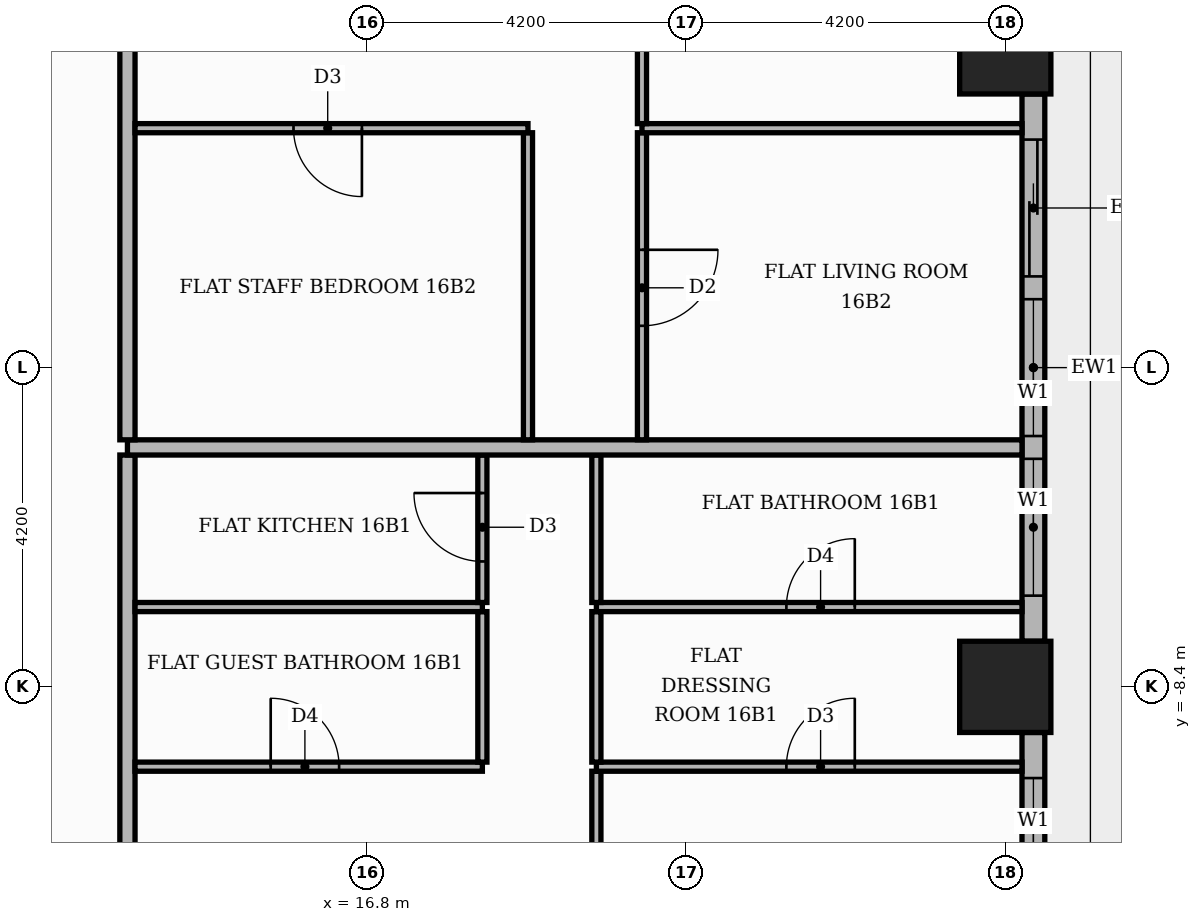
"""IFC4 building model, lengths in metres.
Left out: names, types, materials, properties, quantities, classifications, styles, units other than length and angle.
Written with IfcOpenShell. Run it as: python <this file> out.ifc"""

import sys

from ifc_helpers import new_model, si_unit, direction, frame, frame_2d, origin, origin_2d, place, context, subcontext, project, spatial, rectangle, extrude, element, fill, save


model = new_model("IFC4")
c1 = context("Model", 3, precision=1e-05, world=origin(), true_north=direction((0.0, 1.0)))
c2 = subcontext(c1, "Body", "Model", "MODEL_VIEW")
j1 = project(units=[si_unit("LENGTHUNIT", "METRE"), si_unit("PLANEANGLEUNIT", "RADIAN")], contexts=[c1])
p1 = place(None, origin())
s1 = spatial("IfcSite", under=j1, at=p1, CompositionType="ELEMENT")
p2 = place(p1, origin())
s2 = spatial("IfcBuilding", under=s1, at=p2, CompositionType="ELEMENT")
p3 = place(p2, frame((0.0, 0.0, 69.9)))
s3 = spatial("IfcBuildingStorey", under=s2, at=p3, CompositionType="ELEMENT", Elevation=69.9)
for number, where, z_axis, x_axis in (
    (1, (25.2, 0.0, 0.0), (0.0, 0.0, 1.0), (1.0, 0.0, 0.0)),
    (2, (25.2, -8.4, 0.0), (0.0, 0.0, 1.0), (1.0, 0.0, 0.0)),
):
    element("IfcColumn", number, at=place(p3, frame(where, z_axis=z_axis, x_axis=x_axis)), inside=s3, PredefinedType="COLUMN", context=c2, shape_type="SweptSolid", body=[
        extrude(rectangle(XDim=1.2, YDim=1.2, at=origin_2d()), origin(), (0.0, 0.0, 1.0), 3.9),
    ])
p4 = place(p3, frame((25.57, -16.2, 0.0), z_axis=(0.0, 0.0, 1.0), x_axis=(0.0, 1.0, 0.0)))
e3 = element("IfcWall", 3, at=p4, inside=s3, PredefinedType="STANDARD", context=c2, shape_type="SweptSolid", body=[
    extrude(rectangle(XDim=7.2, YDim=0.3, at=frame_2d((3.6, 0.0))), origin(), (0.0, 0.0, 1.0), 3.4),
])
p5 = place(p4, frame((0.6, 0.0, 0.0)))
e4 = element("IfcOpeningElement", 4, at=p5, cuts=e3, PredefinedType="OPENING", context=c2, shape_type="SweptSolid", body=[
    extrude(rectangle(XDim=1.8, YDim=2.4, at=frame_2d((0.9, 1.2))), frame((0.0, 0.16, 0.0), z_axis=(0.0, -1.0, 0.0), x_axis=(1.0, 0.0, 0.0)), (0.0, 0.0, 1.0), 0.32),
])
p6 = place(p4, frame((2.7, 0.0, 0.0)))
e5 = element("IfcOpeningElement", 5, at=p6, cuts=e3, PredefinedType="OPENING", context=c2, shape_type="SweptSolid", body=[
    extrude(rectangle(XDim=1.8, YDim=2.4, at=frame_2d((0.9, 1.2))), frame((0.0, 0.16, 0.0), z_axis=(0.0, -1.0, 0.0), x_axis=(1.0, 0.0, 0.0)), (0.0, 0.0, 1.0), 0.32),
])
p7 = place(p4, frame((4.8, 0.0, 0.9)))
e6 = element("IfcOpeningElement", 6, at=p7, cuts=e3, PredefinedType="OPENING", context=c2, shape_type="SweptSolid", body=[
    extrude(rectangle(XDim=1.8, YDim=2.1, at=frame_2d((0.9, 1.05))), frame((0.0, 0.16, 0.0), z_axis=(0.0, -1.0, 0.0), x_axis=(1.0, 0.0, 0.0)), (0.0, 0.0, 1.0), 0.32),
])
p8 = place(p3, frame((25.57, -7.8, 0.0), z_axis=(0.0, 0.0, 1.0), x_axis=(0.0, 1.0, 0.0)))
e7 = element("IfcWall", 7, at=p8, inside=s3, PredefinedType="STANDARD", context=c2, shape_type="SweptSolid", body=[
    extrude(rectangle(XDim=7.2, YDim=0.3, at=frame_2d((3.6, 0.0))), origin(), (0.0, 0.0, 1.0), 3.4),
])
p9 = place(p8, frame((0.6, 0.0, 0.9)))
e8 = element("IfcOpeningElement", 8, at=p9, cuts=e7, PredefinedType="OPENING", context=c2, shape_type="SweptSolid", body=[
    extrude(rectangle(XDim=1.8, YDim=2.1, at=frame_2d((0.9, 1.05))), frame((0.0, 0.16, 0.0), z_axis=(0.0, -1.0, 0.0), x_axis=(1.0, 0.0, 0.0)), (0.0, 0.0, 1.0), 0.32),
])
p10 = place(p8, frame((2.7, 0.0, 0.9)))
e9 = element("IfcOpeningElement", 9, at=p10, cuts=e7, PredefinedType="OPENING", context=c2, shape_type="SweptSolid", body=[
    extrude(rectangle(XDim=1.8, YDim=2.1, at=frame_2d((0.9, 1.05))), frame((0.0, 0.16, 0.0), z_axis=(0.0, -1.0, 0.0), x_axis=(1.0, 0.0, 0.0)), (0.0, 0.0, 1.0), 0.32),
])
p11 = place(p8, frame((4.8, 0.0, 0.0)))
e10 = element("IfcOpeningElement", 10, at=p11, cuts=e7, PredefinedType="OPENING", context=c2, shape_type="SweptSolid", body=[
    extrude(rectangle(XDim=1.8, YDim=2.4, at=frame_2d((0.9, 1.2))), frame((0.0, 0.16, 0.0), z_axis=(0.0, -1.0, 0.0), x_axis=(1.0, 0.0, 0.0)), (0.0, 0.0, 1.0), 0.32),
])
p12 = place(p3, frame((19.82, -13.59, 0.0), z_axis=(0.0, 0.0, 1.0), x_axis=(0.0, 1.0, 0.0)))
e11 = element("IfcWall", 11, at=p12, inside=s3, PredefinedType="PARTITIONING", context=c2, shape_type="SweptSolid", body=[
    extrude(rectangle(XDim=4.08, YDim=0.12, at=frame_2d((2.04, 0.0))), origin(), (0.0, 0.0, 1.0), 3.4),
])
p13 = place(p12, frame((1.59, 0.0, 0.0)))
e12 = element("IfcOpeningElement", 12, at=p13, cuts=e11, PredefinedType="OPENING", context=c2, shape_type="SweptSolid", body=[
    extrude(rectangle(XDim=0.9, YDim=2.1, at=frame_2d((0.45, 1.05))), frame((0.0, 0.07, 0.0), z_axis=(0.0, -1.0, 0.0), x_axis=(1.0, 0.0, 0.0)), (0.0, 0.0, 1.0), 0.14),
])
p14 = place(p3, frame((13.65, -13.55, 0.0), z_axis=(0.0, 0.0, 1.0), x_axis=(0.0, 1.0, 0.0)))
e13 = element("IfcWall", 13, at=p14, inside=s3, PredefinedType="PARTITIONING", context=c2, shape_type="SweptSolid", body=[
    extrude(rectangle(XDim=8.2, YDim=0.2, at=frame_2d((4.1, 0.0))), origin(), (0.0, 0.0, 1.0), 3.4),
])
p15 = place(p14, frame((1.45, 0.0, 0.0)))
e14 = element("IfcOpeningElement", 14, at=p15, cuts=e13, PredefinedType="OPENING", context=c2, shape_type="SweptSolid", body=[
    extrude(rectangle(XDim=1.1, YDim=2.4, at=frame_2d((0.55, 1.2))), frame((0.0, 0.11, 0.0), z_axis=(0.0, -1.0, 0.0), x_axis=(1.0, 0.0, 0.0)), (0.0, 0.0, 1.0), 0.22),
])
p16 = place(p3, frame((13.75, -9.45, 0.0), z_axis=(0.0, 0.0, 1.0), x_axis=(1.0, 0.0, 0.0)))
e15 = element("IfcWall", 15, at=p16, inside=s3, PredefinedType="PARTITIONING", context=c2, shape_type="SweptSolid", body=[
    extrude(rectangle(XDim=4.57, YDim=0.12, at=frame_2d((2.285, 0.0))), origin(), (0.0, 0.0, 1.0), 3.4),
])
p17 = place(p16, frame((1.785, 0.0, 0.0)))
e16 = element("IfcOpeningElement", 16, at=p17, cuts=e15, PredefinedType="OPENING", context=c2, shape_type="SweptSolid", body=[
    extrude(rectangle(XDim=0.9, YDim=2.1, at=frame_2d((0.45, 1.05))), frame((0.0, 0.07, 0.0), z_axis=(0.0, -1.0, 0.0), x_axis=(1.0, 0.0, 0.0)), (0.0, 0.0, 1.0), 0.14),
])
p18 = place(p3, frame((19.82, -9.45, 0.0), z_axis=(0.0, 0.0, 1.0), x_axis=(1.0, 0.0, 0.0)))
e17 = element("IfcWall", 17, at=p18, inside=s3, PredefinedType="PARTITIONING", context=c2, shape_type="SweptSolid", body=[
    extrude(rectangle(XDim=5.6, YDim=0.12, at=frame_2d((2.8, 0.0))), origin(), (0.0, 0.0, 1.0), 3.4),
])
p19 = place(p18, frame((2.5, 0.0, 0.0)))
e18 = element("IfcOpeningElement", 18, at=p19, cuts=e17, PredefinedType="OPENING", context=c2, shape_type="SweptSolid", body=[
    extrude(rectangle(XDim=0.9, YDim=2.1, at=frame_2d((0.45, 1.05))), frame((0.0, 0.07, 0.0), z_axis=(0.0, -1.0, 0.0), x_axis=(1.0, 0.0, 0.0)), (0.0, 0.0, 1.0), 0.14),
])
for number, where, z_axis, x_axis in (
    (19, (18.32, -9.39, 0.0), (0.0, 0.0, 1.0), (0.0, 1.0, 0.0)),
    (20, (19.82, -9.39, 0.0), (0.0, 0.0, 1.0), (0.0, 1.0, 0.0)),
):
    element("IfcWall", number, at=place(p3, frame(where, z_axis=z_axis, x_axis=x_axis)), inside=s3, PredefinedType="PARTITIONING", context=c2, shape_type="SweptSolid", body=[
        extrude(rectangle(XDim=1.98, YDim=0.12, at=frame_2d((0.99, 0.0))), origin(), (0.0, 0.0, 1.0), 3.4),
    ])
p20 = place(p3, frame((13.75, -7.35, 0.0), z_axis=(0.0, 0.0, 1.0), x_axis=(1.0, 0.0, 0.0)))
e21 = element("IfcWall", 21, at=p20, inside=s3, PredefinedType="PARTITIONING", context=c2, shape_type="SweptSolid", body=[
    extrude(rectangle(XDim=4.57, YDim=0.12, at=frame_2d((2.285, 0.0))), origin(), (0.0, 0.0, 1.0), 3.4),
])
p21 = place(p3, frame((19.82, -7.35, 0.0), z_axis=(0.0, 0.0, 1.0), x_axis=(1.0, 0.0, 0.0)))
e22 = element("IfcWall", 22, at=p21, inside=s3, PredefinedType="PARTITIONING", context=c2, shape_type="SweptSolid", body=[
    extrude(rectangle(XDim=5.6, YDim=0.12, at=frame_2d((2.8, 0.0))), origin(), (0.0, 0.0, 1.0), 3.4),
])
p22 = place(p21, frame((2.5, 0.0, 0.0)))
e23 = element("IfcOpeningElement", 23, at=p22, cuts=e22, PredefinedType="OPENING", context=c2, shape_type="SweptSolid", body=[
    extrude(rectangle(XDim=0.9, YDim=2.1, at=frame_2d((0.45, 1.05))), frame((0.0, 0.07, 0.0), z_axis=(0.0, -1.0, 0.0), x_axis=(1.0, 0.0, 0.0)), (0.0, 0.0, 1.0), 0.14),
])
p23 = place(p3, frame((18.32, -7.29, 0.0), z_axis=(0.0, 0.0, 1.0), x_axis=(0.0, 1.0, 0.0)))
e24 = element("IfcWall", 24, at=p23, inside=s3, PredefinedType="PARTITIONING", context=c2, shape_type="SweptSolid", body=[
    extrude(rectangle(XDim=1.94, YDim=0.12, at=frame_2d((0.97, 0.0))), origin(), (0.0, 0.0, 1.0), 3.4),
])
p24 = place(p23, frame((0.54, 0.0, 0.0)))
e25 = element("IfcOpeningElement", 25, at=p24, cuts=e24, PredefinedType="OPENING", context=c2, shape_type="SweptSolid", body=[
    extrude(rectangle(XDim=0.9, YDim=2.1, at=frame_2d((0.45, 1.05))), frame((0.0, 0.07, 0.0), z_axis=(0.0, -1.0, 0.0), x_axis=(1.0, 0.0, 0.0)), (0.0, 0.0, 1.0), 0.14),
])
p25 = place(p3, frame((19.82, -7.29, 0.0), z_axis=(0.0, 0.0, 1.0), x_axis=(0.0, 1.0, 0.0)))
e26 = element("IfcWall", 26, at=p25, inside=s3, PredefinedType="PARTITIONING", context=c2, shape_type="SweptSolid", body=[
    extrude(rectangle(XDim=1.94, YDim=0.12, at=frame_2d((0.97, 0.0))), origin(), (0.0, 0.0, 1.0), 3.4),
])
p26 = place(p3, frame((13.65, -5.25, 0.0), z_axis=(0.0, 0.0, 1.0), x_axis=(1.0, 0.0, 0.0)))
e27 = element("IfcWall", 27, at=p26, inside=s3, PredefinedType="PARTITIONING", context=c2, shape_type="SweptSolid", body=[
    extrude(rectangle(XDim=11.77, YDim=0.2, at=frame_2d((5.885, 0.0))), origin(), (0.0, 0.0, 1.0), 3.4),
])
p27 = place(p3, frame((13.65, -5.15, 0.0), z_axis=(0.0, 0.0, 1.0), x_axis=(0.0, 1.0, 0.0)))
e28 = element("IfcWall", 28, at=p27, inside=s3, PredefinedType="PARTITIONING", context=c2, shape_type="SweptSolid", body=[
    extrude(rectangle(XDim=18.7, YDim=0.2, at=frame_2d((9.35, 0.0))), origin(), (0.0, 0.0, 1.0), 3.4),
])
p28 = place(p27, frame((5.65, 0.0, 0.0)))
e29 = element("IfcOpeningElement", 29, at=p28, cuts=e28, PredefinedType="OPENING", context=c2, shape_type="SweptSolid", body=[
    extrude(rectangle(XDim=1.1, YDim=2.4, at=frame_2d((0.55, 1.2))), frame((0.0, 0.11, 0.0), z_axis=(0.0, -1.0, 0.0), x_axis=(1.0, 0.0, 0.0)), (0.0, 0.0, 1.0), 0.22),
])
p29 = place(p3, frame((18.92, -5.15, 0.0), z_axis=(0.0, 0.0, 1.0), x_axis=(0.0, 1.0, 0.0)))
e30 = element("IfcWall", 30, at=p29, inside=s3, PredefinedType="PARTITIONING", context=c2, shape_type="SweptSolid", body=[
    extrude(rectangle(XDim=4.04, YDim=0.12, at=frame_2d((2.02, 0.0))), origin(), (0.0, 0.0, 1.0), 3.4),
])
p30 = place(p3, frame((20.42, -5.15, 0.0), z_axis=(0.0, 0.0, 1.0), x_axis=(0.0, 1.0, 0.0)))
e31 = element("IfcWall", 31, at=p30, inside=s3, PredefinedType="PARTITIONING", context=c2, shape_type="SweptSolid", body=[
    extrude(rectangle(XDim=4.04, YDim=0.12, at=frame_2d((2.02, 0.0))), origin(), (0.0, 0.0, 1.0), 3.4),
])
p31 = place(p30, frame((1.5, 0.0, 0.0)))
e32 = element("IfcOpeningElement", 32, at=p31, cuts=e31, PredefinedType="OPENING", context=c2, shape_type="SweptSolid", body=[
    extrude(rectangle(XDim=1.0, YDim=2.1, at=frame_2d((0.5, 1.05))), frame((0.0, 0.07, 0.0), z_axis=(0.0, -1.0, 0.0), x_axis=(1.0, 0.0, 0.0)), (0.0, 0.0, 1.0), 0.14),
])
p32 = place(p3, frame((13.75, -1.05, 0.0), z_axis=(0.0, 0.0, 1.0), x_axis=(1.0, 0.0, 0.0)))
e33 = element("IfcWall", 33, at=p32, inside=s3, PredefinedType="PARTITIONING", context=c2, shape_type="SweptSolid", body=[
    extrude(rectangle(XDim=5.17, YDim=0.12, at=frame_2d((2.585, 0.0))), origin(), (0.0, 0.0, 1.0), 3.4),
])
p33 = place(p32, frame((2.085, 0.0, 0.0)))
e34 = element("IfcOpeningElement", 34, at=p33, cuts=e33, PredefinedType="OPENING", context=c2, shape_type="SweptSolid", body=[
    extrude(rectangle(XDim=0.9, YDim=2.1, at=frame_2d((0.45, 1.05))), frame((0.0, 0.07, 0.0), z_axis=(0.0, -1.0, 0.0), x_axis=(1.0, 0.0, 0.0)), (0.0, 0.0, 1.0), 0.14),
])
p34 = place(p3, frame((20.42, -1.05, 0.0), z_axis=(0.0, 0.0, 1.0), x_axis=(1.0, 0.0, 0.0)))
e35 = element("IfcWall", 35, at=p34, inside=s3, PredefinedType="PARTITIONING", context=c2, shape_type="SweptSolid", body=[
    extrude(rectangle(XDim=5.0, YDim=0.12, at=frame_2d((2.5, 0.0))), origin(), (0.0, 0.0, 1.0), 3.4),
])
p35 = place(p3, frame((20.42, -0.99, 0.0), z_axis=(0.0, 0.0, 1.0), x_axis=(0.0, 1.0, 0.0)))
e36 = element("IfcWall", 36, at=p35, inside=s3, PredefinedType="PARTITIONING", context=c2, shape_type="SweptSolid", body=[
    extrude(rectangle(XDim=4.08, YDim=0.12, at=frame_2d((2.04, 0.0))), origin(), (0.0, 0.0, 1.0), 3.4),
])
p36 = place(p35, frame((1.59, 0.0, 0.0)))
e37 = element("IfcOpeningElement", 37, at=p36, cuts=e36, PredefinedType="OPENING", context=c2, shape_type="SweptSolid", body=[
    extrude(rectangle(XDim=0.9, YDim=2.1, at=frame_2d((0.45, 1.05))), frame((0.0, 0.07, 0.0), z_axis=(0.0, -1.0, 0.0), x_axis=(1.0, 0.0, 0.0)), (0.0, 0.0, 1.0), 0.14),
])
p37 = place(p7, origin())
e38 = element("IfcWindow", 38, at=p37, inside=s3, PartitioningType="SINGLE_PANEL", PredefinedType="WINDOW", context=c2, shape_type="SweptSolid", body=[
    extrude(rectangle(XDim=1.8, YDim=2.1, at=frame_2d((0.9, 1.05))), frame((0.0, 0.03, 0.0), z_axis=(0.0, -1.0, 0.0), x_axis=(1.0, 0.0, 0.0)), (0.0, 0.0, 1.0), 0.06),
])
fill(e6, e38)
p38 = place(p9, origin())
e39 = element("IfcWindow", 39, at=p38, inside=s3, PartitioningType="SINGLE_PANEL", PredefinedType="WINDOW", context=c2, shape_type="SweptSolid", body=[
    extrude(rectangle(XDim=1.8, YDim=2.1, at=frame_2d((0.9, 1.05))), frame((0.0, 0.03, 0.0), z_axis=(0.0, -1.0, 0.0), x_axis=(1.0, 0.0, 0.0)), (0.0, 0.0, 1.0), 0.06),
])
fill(e8, e39)
p39 = place(p10, origin())
e40 = element("IfcWindow", 40, at=p39, inside=s3, PartitioningType="SINGLE_PANEL", PredefinedType="WINDOW", context=c2, shape_type="SweptSolid", body=[
    extrude(rectangle(XDim=1.8, YDim=2.1, at=frame_2d((0.9, 1.05))), frame((0.0, 0.03, 0.0), z_axis=(0.0, -1.0, 0.0), x_axis=(1.0, 0.0, 0.0)), (0.0, 0.0, 1.0), 0.06),
])
fill(e9, e40)
p40 = place(p11, origin())
e41 = element("IfcDoor", 41, at=p40, inside=s3, OperationType="SLIDING_TO_RIGHT", PredefinedType="DOOR", context=c2, shape_type="SweptSolid", body=[
    extrude(rectangle(XDim=1.8, YDim=2.4, at=frame_2d((0.9, 1.2))), frame((0.0, 0.025, 0.0), z_axis=(0.0, -1.0, 0.0), x_axis=(1.0, 0.0, 0.0)), (0.0, 0.0, 1.0), 0.05),
])
fill(e10, e41)
p41 = place(p17, origin())
e42 = element("IfcDoor", 42, at=p41, inside=s3, OperationType="SINGLE_SWING_LEFT", PredefinedType="DOOR", context=c2, shape_type="SweptSolid", body=[
    extrude(rectangle(XDim=0.9, YDim=2.1, at=frame_2d((0.45, 1.05))), frame((0.0, 0.025, 0.0), z_axis=(0.0, -1.0, 0.0), x_axis=(1.0, 0.0, 0.0)), (0.0, 0.0, 1.0), 0.05),
])
fill(e16, e42)
p42 = place(p24, origin())
e43 = element("IfcDoor", 43, at=p42, inside=s3, OperationType="SINGLE_SWING_RIGHT", PredefinedType="DOOR", context=c2, shape_type="SweptSolid", body=[
    extrude(rectangle(XDim=0.9, YDim=2.1, at=frame_2d((0.45, 1.05))), frame((0.0, 0.025, 0.0), z_axis=(0.0, -1.0, 0.0), x_axis=(1.0, 0.0, 0.0)), (0.0, 0.0, 1.0), 0.05),
])
fill(e25, e43)
p43 = place(p19, origin())
e44 = element("IfcDoor", 44, at=p43, inside=s3, OperationType="SINGLE_SWING_RIGHT", PredefinedType="DOOR", context=c2, shape_type="SweptSolid", body=[
    extrude(rectangle(XDim=0.9, YDim=2.1, at=frame_2d((0.45, 1.05))), frame((0.0, 0.025, 0.0), z_axis=(0.0, -1.0, 0.0), x_axis=(1.0, 0.0, 0.0)), (0.0, 0.0, 1.0), 0.05),
])
fill(e18, e44)
p44 = place(p22, origin())
e45 = element("IfcDoor", 45, at=p44, inside=s3, OperationType="SINGLE_SWING_RIGHT", PredefinedType="DOOR", context=c2, shape_type="SweptSolid", body=[
    extrude(rectangle(XDim=0.9, YDim=2.1, at=frame_2d((0.45, 1.05))), frame((0.0, 0.025, 0.0), z_axis=(0.0, -1.0, 0.0), x_axis=(1.0, 0.0, 0.0)), (0.0, 0.0, 1.0), 0.05),
])
fill(e23, e45)
p45 = place(p33, frame((0.9, 0.0, 0.0), z_axis=(0.0, 0.0, 1.0), x_axis=(-1.0, 0.0, 0.0)))
e46 = element("IfcDoor", 46, at=p45, inside=s3, OperationType="SINGLE_SWING_RIGHT", PredefinedType="DOOR", context=c2, shape_type="SweptSolid", body=[
    extrude(rectangle(XDim=0.9, YDim=2.1, at=frame_2d((0.45, 1.05))), frame((0.0, 0.025, 0.0), z_axis=(0.0, -1.0, 0.0), x_axis=(1.0, 0.0, 0.0)), (0.0, 0.0, 1.0), 0.05),
])
fill(e34, e46)
p46 = place(p31, frame((1.0, 0.0, 0.0), z_axis=(0.0, 0.0, 1.0), x_axis=(-1.0, 0.0, 0.0)))
e47 = element("IfcDoor", 47, at=p46, inside=s3, OperationType="SINGLE_SWING_RIGHT", PredefinedType="DOOR", context=c2, shape_type="SweptSolid", body=[
    extrude(rectangle(XDim=1.0, YDim=2.1, at=frame_2d((0.5, 1.05))), frame((0.0, 0.025, 0.0), z_axis=(0.0, -1.0, 0.0), x_axis=(1.0, 0.0, 0.0)), (0.0, 0.0, 1.0), 0.05),
])
fill(e32, e47)
save(model, sys.argv[1])
